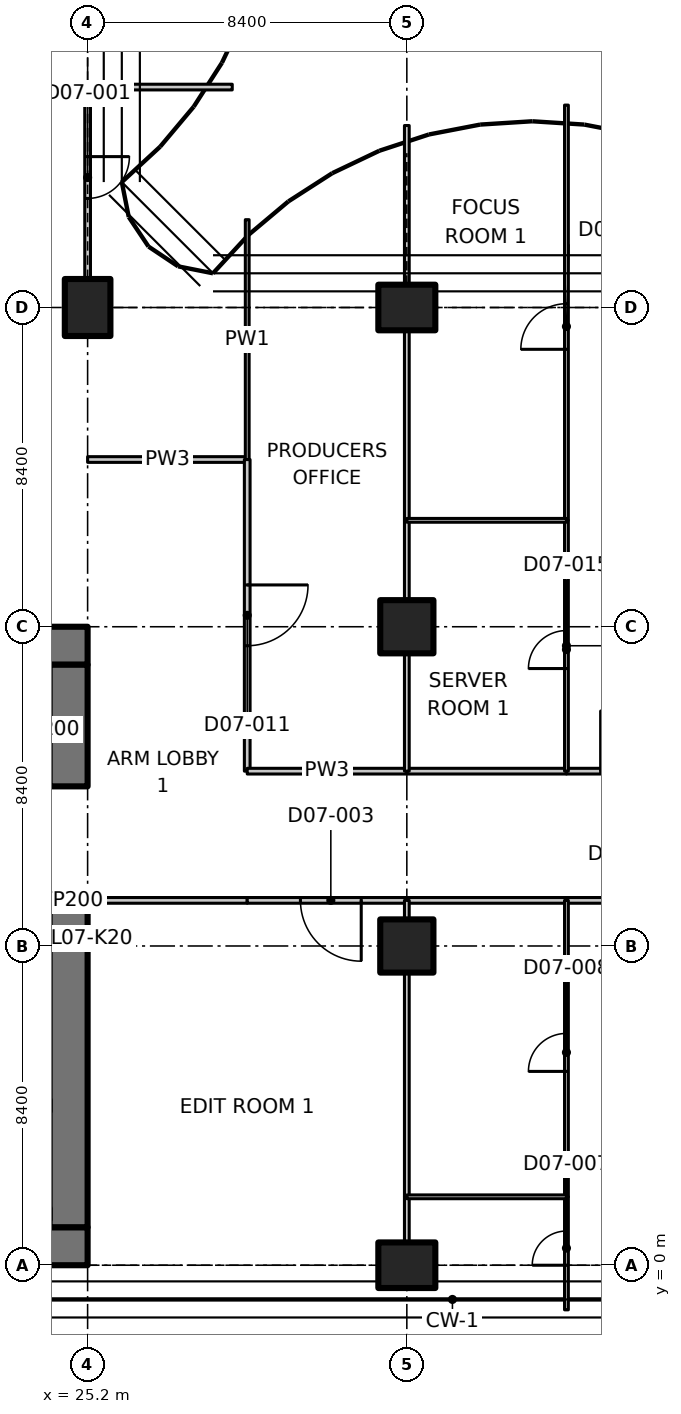
"""IFC4 building model, lengths in metres.
Left out: names, types, materials, properties, quantities, classifications, styles, units other than length and angle.
Written with IfcOpenShell. Run it as: python <this file> out.ifc"""

import sys

from ifc_helpers import new_model, si_unit, direction, frame, frame_2d, origin, origin_2d, place, context, subcontext, project, spatial, polyline, rectangle, outline, extrude, element, fill, save


model = new_model("IFC4")
c1 = context("Model", 3, precision=1e-05, world=origin(), true_north=direction((0.0, 1.0)))
c2 = subcontext(c1, "Body", "Model", "MODEL_VIEW")
j1 = project(units=[si_unit("LENGTHUNIT", "METRE"), si_unit("PLANEANGLEUNIT", "RADIAN")], contexts=[c1])
p1 = place(None, origin())
s1 = spatial("IfcSite", under=j1, at=p1, CompositionType="ELEMENT")
p2 = place(p1, origin())
s2 = spatial("IfcBuilding", under=s1, at=p2, CompositionType="ELEMENT")
p3 = place(p2, frame((0.0, 0.0, 40.1)))
s3 = spatial("IfcBuildingStorey", under=s2, at=p3, CompositionType="ELEMENT", Elevation=40.1)
for number, where, z_axis, x_axis in (
    (1, (25.2, 25.2, 0.0), (0.0, 0.0, 1.0), (1.0, 0.0, 0.0)),
    (2, (33.6, 0.0, 0.0), (0.0, 0.0, 1.0), (0.0, 1.0, 0.0)),
):
    element("IfcColumn", number, at=place(p3, frame(where, z_axis=z_axis, x_axis=x_axis)), inside=s3, PredefinedType="COLUMN", context=c2, shape_type="SweptSolid", body=[
        extrude(rectangle(XDim=1.2, YDim=1.5, at=origin_2d()), origin(), (0.0, 0.0, 1.0), 3.35),
    ])
for number, where, z_axis, x_axis in (
    (3, (33.6, 8.4, 0.0), (0.0, 0.0, 1.0), (1.0, 0.0, 0.0)),
    (4, (33.6, 16.8, 0.0), (0.0, 0.0, 1.0), (1.0, 0.0, 0.0)),
):
    element("IfcColumn", number, at=place(p3, frame(where, z_axis=z_axis, x_axis=x_axis)), inside=s3, PredefinedType="COLUMN", context=c2, shape_type="SweptSolid", body=[
        extrude(rectangle(XDim=1.4, YDim=1.4, at=origin_2d()), origin(), (0.0, 0.0, 1.0), 3.35),
    ])
p4 = place(p3, frame((33.6, 25.2, 0.0), z_axis=(0.0, 0.0, 1.0), x_axis=(0.0, 1.0, 0.0)))
e5 = element("IfcColumn", 5, at=p4, inside=s3, PredefinedType="COLUMN", context=c2, shape_type="SweptSolid", body=[
    extrude(rectangle(XDim=1.2, YDim=1.5, at=origin_2d()), origin(), (0.0, 0.0, 1.0), 3.35),
])
p5 = place(p3, frame((6.936, 0.5, 0.0), z_axis=(0.0, 0.0, 1.0), x_axis=(1.0, 0.0, 0.0)))
e6 = element("IfcWall", 6, at=p5, inside=s3, PredefinedType="SHEAR", context=c2, shape_type="SweptSolid", body=[
    extrude(rectangle(XDim=18.264, YDim=1.0, at=frame_2d((9.132, 0.0))), origin(), (0.0, 0.0, 1.0), 3.35),
])
p6 = place(p3, frame((23.8, 16.3, 0.0), z_axis=(0.0, 0.0, 1.0), x_axis=(1.0, 0.0, 0.0)))
e7 = element("IfcWall", 7, at=p6, inside=s3, PredefinedType="SHEAR", context=c2, shape_type="SweptSolid", body=[
    extrude(rectangle(XDim=1.4, YDim=1.0, at=frame_2d((0.7, 0.0))), origin(), (0.0, 0.0, 1.0), 3.35),
])
p7 = place(p3, frame((24.7, 1.0, 0.0), z_axis=(0.0, 0.0, 1.0), x_axis=(0.0, 1.0, 0.0)))
e8 = element("IfcWall", 8, at=p7, inside=s3, PredefinedType="SHEAR", context=c2, shape_type="SweptSolid", body=[
    extrude(rectangle(XDim=8.8, YDim=1.0, at=frame_2d((4.4, 0.0))), origin(), (0.0, 0.0, 1.0), 3.35),
])
p8 = place(p3, frame((24.7, 12.6, 0.0), z_axis=(0.0, 0.0, 1.0), x_axis=(0.0, 1.0, 0.0)))
e9 = element("IfcWall", 9, at=p8, inside=s3, PredefinedType="SHEAR", context=c2, shape_type="SweptSolid", body=[
    extrude(rectangle(XDim=3.2, YDim=1.0, at=frame_2d((1.6, 0.0))), origin(), (0.0, 0.0, 1.0), 3.35),
])
for number, where, z_axis, x_axis in (
    (10, (25.2, 21.2, 0.0), (0.0, 0.0, 1.0), (1.0, 0.0, 0.0)),
    (11, (29.4, 9.6, 0.0), (0.0, 0.0, 1.0), (-1.0, 0.0, 0.0)),
):
    element("IfcWall", number, at=place(p3, frame(where, z_axis=z_axis, x_axis=x_axis)), inside=s3, PredefinedType="PARTITIONING", context=c2, shape_type="SweptSolid", body=[
        extrude(rectangle(XDim=4.2, YDim=0.15, at=frame_2d((2.1, 0.0))), origin(), (0.0, 0.0, 1.0), 3.33),
    ])
p9 = place(p3, frame((29.4, 21.2, 0.0), z_axis=(0.0, 0.0, 1.0), x_axis=(0.0, -1.0, 0.0)))
e12 = element("IfcWall", 12, at=p9, inside=s3, PredefinedType="PARTITIONING", context=c2, shape_type="SweptSolid", body=[
    extrude(rectangle(XDim=8.2, YDim=0.15, at=frame_2d((4.1, 0.0))), origin(), (0.0, 0.0, 1.0), 3.33),
])
p10 = place(p9, frame((3.3, 0.0, 0.0)))
e13 = element("IfcOpeningElement", 13, at=p10, cuts=e12, PredefinedType="OPENING", context=c2, shape_type="SweptSolid", body=[
    extrude(rectangle(XDim=1.6, YDim=2.1, at=frame_2d((0.8, 1.05))), frame((0.0, 0.085, 0.0), z_axis=(0.0, -1.0, 0.0), x_axis=(1.0, 0.0, 0.0)), (0.0, 0.0, 1.0), 0.17),
])
p11 = place(p3, frame((29.4, 27.511, 0.0), z_axis=(0.0, 0.0, 1.0), x_axis=(0.0, -1.0, 0.0)))
e14 = element("IfcWall", 14, at=p11, inside=s3, PredefinedType="PARTITIONING", context=c2, shape_type="SweptSolid", body=[
    extrude(outline(polyline([(0.0, 0.0), (6.311, 0.0), (6.311, 3.33), (2.761, 3.33), (2.759, 2.98), (1.863, 2.98), (1.861, 3.33), (0.236, 3.33), (0.0, 3.33), (0.0, 0.0)])), frame((0.0, 0.05, 0.0), z_axis=(0.0, -1.0, 0.0), x_axis=(1.0, 0.0, 0.0)), (0.0, 0.0, 1.0), 0.1),
])
p12 = place(p3, frame((25.2, 31.0, 0.0), z_axis=(0.0, 0.0, 1.0), x_axis=(0.0, -1.0, 0.0)))
e15 = element("IfcWall", 15, at=p12, inside=s3, PredefinedType="PARTITIONING", context=c2, shape_type="SweptSolid", body=[
    extrude(outline(polyline([(0.0, 0.0), (5.03, 0.0), (5.03, 2.98), (0.0, 2.98), (0.0, 0.0)])), frame((0.0, 0.075, 0.0), z_axis=(0.0, -1.0, 0.0), x_axis=(1.0, 0.0, 0.0)), (0.0, 0.0, 1.0), 0.15),
])
p13 = place(p12, frame((1.83, 0.0, 0.0)))
e16 = element("IfcOpeningElement", 16, at=p13, cuts=e15, PredefinedType="OPENING", context=c2, shape_type="SweptSolid", body=[
    extrude(rectangle(XDim=1.1, YDim=2.1, at=frame_2d((0.55, 1.05))), frame((0.0, 0.085, 0.0), z_axis=(0.0, -1.0, 0.0), x_axis=(1.0, 0.0, 0.0)), (0.0, 0.0, 1.0), 0.17),
])
p14 = place(p3, frame((25.2, 31.0, 0.0), z_axis=(0.0, 0.0, 1.0), x_axis=(1.0, 0.0, 0.0)))
e17 = element("IfcWall", 17, at=p14, inside=s3, PredefinedType="PARTITIONING", context=c2, shape_type="SweptSolid", body=[
    extrude(rectangle(XDim=3.806, YDim=0.15, at=frame_2d((1.903, 0.0))), origin(), (0.0, 0.0, 1.0), 2.98),
])
p15 = place(p3, frame((33.6, 9.6, 0.0), z_axis=(0.0, 0.0, 1.0), x_axis=(-1.0, 0.0, 0.0)))
e18 = element("IfcWall", 18, at=p15, inside=s3, PredefinedType="PARTITIONING", context=c2, shape_type="SweptSolid", body=[
    extrude(rectangle(XDim=4.2, YDim=0.15, at=frame_2d((2.1, 0.0))), origin(), (0.0, 0.0, 1.0), 3.33),
])
p16 = place(p15, frame((1.2, 0.0, 0.0)))
e19 = element("IfcOpeningElement", 19, at=p16, cuts=e18, PredefinedType="OPENING", context=c2, shape_type="SweptSolid", body=[
    extrude(rectangle(XDim=1.6, YDim=2.1, at=frame_2d((0.8, 1.05))), frame((0.0, 0.085, 0.0), z_axis=(0.0, -1.0, 0.0), x_axis=(1.0, 0.0, 0.0)), (0.0, 0.0, 1.0), 0.17),
])
p17 = place(p3, frame((46.2, 9.6, 0.0), z_axis=(0.0, 0.0, 1.0), x_axis=(-1.0, 0.0, 0.0)))
e20 = element("IfcWall", 20, at=p17, inside=s3, PredefinedType="PARTITIONING", context=c2, shape_type="SweptSolid", body=[
    extrude(rectangle(XDim=8.4, YDim=0.15, at=frame_2d((4.2, 0.0))), origin(), (0.0, 0.0, 1.0), 3.33),
])
p18 = place(p17, frame((1.8, 0.0, 0.0)))
e21 = element("IfcOpeningElement", 21, at=p18, cuts=e20, PredefinedType="OPENING", context=c2, shape_type="SweptSolid", body=[
    extrude(rectangle(XDim=1.6, YDim=2.1, at=frame_2d((0.8, 1.05))), frame((0.0, 0.085, 0.0), z_axis=(0.0, -1.0, 0.0), x_axis=(1.0, 0.0, 0.0)), (0.0, 0.0, 1.0), 0.17),
])
p19 = place(p3, frame((37.8, 9.6, 0.0), z_axis=(0.0, 0.0, 1.0), x_axis=(-1.0, 0.0, 0.0)))
e22 = element("IfcWall", 22, at=p19, inside=s3, PredefinedType="PARTITIONING", context=c2, shape_type="SweptSolid", body=[
    extrude(rectangle(XDim=4.2, YDim=0.15, at=frame_2d((2.1, 0.0))), origin(), (0.0, 0.0, 1.0), 3.33),
])
p20 = place(p3, frame((29.4, 13.0, 0.0), z_axis=(0.0, 0.0, 1.0), x_axis=(1.0, 0.0, 0.0)))
e23 = element("IfcWall", 23, at=p20, inside=s3, PredefinedType="PARTITIONING", context=c2, shape_type="SweptSolid", body=[
    extrude(rectangle(XDim=4.2, YDim=0.15, at=frame_2d((2.1, 0.0))), origin(), (0.0, 0.0, 1.0), 3.33),
])
p21 = place(p3, frame((37.8, 13.0, 0.0), z_axis=(0.0, 0.0, 1.0), x_axis=(1.0, 0.0, 0.0)))
e24 = element("IfcWall", 24, at=p21, inside=s3, PredefinedType="PARTITIONING", context=c2, shape_type="SweptSolid", body=[
    extrude(rectangle(XDim=3.4, YDim=0.15, at=frame_2d((1.7, 0.0))), origin(), (0.0, 0.0, 1.0), 3.33),
])
p22 = place(p21, frame((0.9, 0.0, 0.0)))
e25 = element("IfcOpeningElement", 25, at=p22, cuts=e24, PredefinedType="OPENING", context=c2, shape_type="SweptSolid", body=[
    extrude(rectangle(XDim=1.6, YDim=2.1, at=frame_2d((0.8, 1.05))), frame((0.0, 0.085, 0.0), z_axis=(0.0, -1.0, 0.0), x_axis=(1.0, 0.0, 0.0)), (0.0, 0.0, 1.0), 0.17),
])
p23 = place(p3, frame((33.6, 13.0, 0.0), z_axis=(0.0, 0.0, 1.0), x_axis=(1.0, 0.0, 0.0)))
e26 = element("IfcWall", 26, at=p23, inside=s3, PredefinedType="PARTITIONING", context=c2, shape_type="SweptSolid", body=[
    extrude(rectangle(XDim=4.2, YDim=0.15, at=frame_2d((2.1, 0.0))), origin(), (0.0, 0.0, 1.0), 3.33),
])
p24 = place(p3, frame((33.6, 1.8, 0.0), z_axis=(0.0, 0.0, 1.0), x_axis=(0.0, -1.0, 0.0)))
e27 = element("IfcWall", 27, at=p24, inside=s3, PredefinedType="PARTITIONING", context=c2, shape_type="SweptSolid", body=[
    extrude(rectangle(XDim=1.18, YDim=0.125, at=frame_2d((0.59, 0.0))), origin(), (0.0, 0.0, 1.0), 3.33),
])
p25 = place(p3, frame((33.6, 9.6, 0.0), z_axis=(0.0, 0.0, 1.0), x_axis=(0.0, -1.0, 0.0)))
e28 = element("IfcWall", 28, at=p25, inside=s3, PredefinedType="PARTITIONING", context=c2, shape_type="SweptSolid", body=[
    extrude(rectangle(XDim=0.48, YDim=0.125, at=frame_2d((0.24, 0.0))), origin(), (0.0, 0.0, 1.0), 3.33),
])
p26 = place(p3, frame((33.6, 7.68, 0.0), z_axis=(0.0, 0.0, 1.0), x_axis=(0.0, -1.0, 0.0)))
e29 = element("IfcWall", 29, at=p26, inside=s3, PredefinedType="PARTITIONING", context=c2, shape_type="SweptSolid", body=[
    extrude(rectangle(XDim=5.88, YDim=0.125, at=frame_2d((2.94, 0.0))), origin(), (0.0, 0.0, 1.0), 3.33),
])
p27 = place(p3, frame((37.8, -1.174, 0.0), z_axis=(0.0, 0.0, 1.0), x_axis=(0.0, 1.0, 0.0)))
e30 = element("IfcWall", 30, at=p27, inside=s3, PredefinedType="PARTITIONING", context=c2, shape_type="SweptSolid", body=[
    extrude(rectangle(XDim=2.974, YDim=0.1, at=frame_2d((1.487, 0.0))), origin(), (0.0, 0.0, 1.0), 2.98),
])
p28 = place(p27, frame((1.174, 0.0, 0.0)))
e31 = element("IfcOpeningElement", 31, at=p28, cuts=e30, PredefinedType="OPENING", context=c2, shape_type="SweptSolid", body=[
    extrude(rectangle(XDim=0.9, YDim=2.1, at=frame_2d((0.45, 1.05))), frame((0.0, 0.06, 0.0), z_axis=(0.0, -1.0, 0.0), x_axis=(1.0, 0.0, 0.0)), (0.0, 0.0, 1.0), 0.12),
])
p29 = place(p3, frame((37.8, 1.8, 0.0), z_axis=(0.0, 0.0, 1.0), x_axis=(0.0, 1.0, 0.0)))
e32 = element("IfcWall", 32, at=p29, inside=s3, PredefinedType="PARTITIONING", context=c2, shape_type="SweptSolid", body=[
    extrude(rectangle(XDim=7.8, YDim=0.1, at=frame_2d((3.9, 0.0))), origin(), (0.0, 0.0, 1.0), 3.33),
])
p30 = place(p29, frame((3.3, 0.0, 0.0)))
e33 = element("IfcOpeningElement", 33, at=p30, cuts=e32, PredefinedType="OPENING", context=c2, shape_type="SweptSolid", body=[
    extrude(rectangle(XDim=1.0, YDim=2.1, at=frame_2d((0.5, 1.05))), frame((0.0, 0.06, 0.0), z_axis=(0.0, -1.0, 0.0), x_axis=(1.0, 0.0, 0.0)), (0.0, 0.0, 1.0), 0.12),
])
p31 = place(p3, frame((33.6, 1.8, 0.0), z_axis=(0.0, 0.0, 1.0), x_axis=(1.0, 0.0, 0.0)))
e34 = element("IfcWall", 34, at=p31, inside=s3, PredefinedType="PARTITIONING", context=c2, shape_type="SweptSolid", body=[
    extrude(rectangle(XDim=4.2, YDim=0.1, at=frame_2d((2.1, 0.0))), origin(), (0.0, 0.0, 1.0), 3.33),
])
p32 = place(p3, frame((33.6, 19.6, 0.0), z_axis=(0.0, 0.0, 1.0), x_axis=(0.0, -1.0, 0.0)))
e35 = element("IfcWall", 35, at=p32, inside=s3, PredefinedType="PARTITIONING", context=c2, shape_type="SweptSolid", body=[
    extrude(rectangle(XDim=2.08, YDim=0.125, at=frame_2d((1.04, 0.0))), origin(), (0.0, 0.0, 1.0), 3.33),
])
p33 = place(p3, frame((33.6, 16.08, 0.0), z_axis=(0.0, 0.0, 1.0), x_axis=(0.0, -1.0, 0.0)))
e36 = element("IfcWall", 36, at=p33, inside=s3, PredefinedType="PARTITIONING", context=c2, shape_type="SweptSolid", body=[
    extrude(rectangle(XDim=3.08, YDim=0.125, at=frame_2d((1.54, 0.0))), origin(), (0.0, 0.0, 1.0), 3.33),
])
p34 = place(p3, frame((33.6, 29.988, 0.0), z_axis=(0.0, 0.0, 1.0), x_axis=(0.0, -1.0, 0.0)))
e37 = element("IfcWall", 37, at=p34, inside=s3, PredefinedType="PARTITIONING", context=c2, shape_type="SweptSolid", body=[
    extrude(rectangle(XDim=4.168, YDim=0.125, at=frame_2d((2.084, 0.0))), origin(), (0.0, 0.0, 1.0), 2.98),
])
p35 = place(p3, frame((33.6, 24.58, 0.0), z_axis=(0.0, 0.0, 1.0), x_axis=(0.0, -1.0, 0.0)))
e38 = element("IfcWall", 38, at=p35, inside=s3, PredefinedType="PARTITIONING", context=c2, shape_type="SweptSolid", body=[
    extrude(rectangle(XDim=4.98, YDim=0.125, at=frame_2d((2.49, 0.0))), origin(), (0.0, 0.0, 1.0), 3.33),
])
p36 = place(p3, frame((37.8, 13.0, 0.0), z_axis=(0.0, 0.0, 1.0), x_axis=(0.0, 1.0, 0.0)))
e39 = element("IfcWall", 39, at=p36, inside=s3, PredefinedType="PARTITIONING", context=c2, shape_type="SweptSolid", body=[
    extrude(rectangle(XDim=6.6, YDim=0.1, at=frame_2d((3.3, 0.0))), origin(), (0.0, 0.0, 1.0), 3.33),
])
p37 = place(p36, frame((2.7, 0.0, 0.0)))
e40 = element("IfcOpeningElement", 40, at=p37, cuts=e39, PredefinedType="OPENING", context=c2, shape_type="SweptSolid", body=[
    extrude(rectangle(XDim=1.0, YDim=2.1, at=frame_2d((0.5, 1.05))), frame((0.0, 0.06, 0.0), z_axis=(0.0, -1.0, 0.0), x_axis=(1.0, 0.0, 0.0)), (0.0, 0.0, 1.0), 0.12),
])
p38 = place(p3, frame((37.8, 19.6, 0.0), z_axis=(0.0, 0.0, 1.0), x_axis=(0.0, 1.0, 0.0)))
e41 = element("IfcWall", 41, at=p38, inside=s3, PredefinedType="PARTITIONING", context=c2, shape_type="SweptSolid", body=[
    extrude(outline(polyline([(0.0, 0.0), (10.926, 0.0), (10.926, 3.33), (10.643, 3.33), (6.05, 3.33), (6.048, 2.98), (5.152, 2.98), (5.15, 3.33), (0.0, 3.33), (0.0, 0.0)])), frame((0.0, 0.05, 0.0), z_axis=(0.0, -1.0, 0.0), x_axis=(1.0, 0.0, 0.0)), (0.0, 0.0, 1.0), 0.1),
])
p39 = place(p38, frame((4.5, 0.0, 0.0)))
e42 = element("IfcOpeningElement", 42, at=p39, cuts=e41, PredefinedType="OPENING", context=c2, shape_type="SweptSolid", body=[
    extrude(rectangle(XDim=1.2, YDim=2.1, at=frame_2d((0.6, 1.05))), frame((0.0, 0.06, 0.0), z_axis=(0.0, -1.0, 0.0), x_axis=(1.0, 0.0, 0.0)), (0.0, 0.0, 1.0), 0.12),
])
p40 = place(p3, frame((33.6, 19.6, 0.0), z_axis=(0.0, 0.0, 1.0), x_axis=(1.0, 0.0, 0.0)))
e43 = element("IfcWall", 43, at=p40, inside=s3, PredefinedType="PARTITIONING", context=c2, shape_type="SweptSolid", body=[
    extrude(rectangle(XDim=4.2, YDim=0.1, at=frame_2d((2.1, 0.0))), origin(), (0.0, 0.0, 1.0), 3.33),
])
p41 = place(p13, origin())
e44 = element("IfcDoor", 44, at=p41, inside=s3, OperationType="SINGLE_SWING_RIGHT", PredefinedType="DOOR", context=c2, shape_type="SweptSolid", body=[
    extrude(rectangle(XDim=1.1, YDim=2.1, at=frame_2d((0.55, 1.05))), frame((0.0, 0.025, 0.0), z_axis=(0.0, -1.0, 0.0), x_axis=(1.0, 0.0, 0.0)), (0.0, 0.0, 1.0), 0.05),
])
fill(e16, e44)
p42 = place(p16, origin())
e45 = element("IfcDoor", 45, at=p42, inside=s3, OperationType="DOUBLE_DOOR_SINGLE_SWING", PredefinedType="DOOR", context=c2, shape_type="SweptSolid", body=[
    extrude(rectangle(XDim=1.6, YDim=2.1, at=frame_2d((0.8, 1.05))), frame((0.0, 0.025, 0.0), z_axis=(0.0, -1.0, 0.0), x_axis=(1.0, 0.0, 0.0)), (0.0, 0.0, 1.0), 0.05),
])
fill(e19, e45)
p43 = place(p28, origin())
e46 = element("IfcDoor", 46, at=p43, inside=s3, OperationType="SINGLE_SWING_LEFT", PredefinedType="DOOR", context=c2, shape_type="SweptSolid", body=[
    extrude(rectangle(XDim=0.9, YDim=2.1, at=frame_2d((0.45, 1.05))), frame((0.0, 0.025, 0.0), z_axis=(0.0, -1.0, 0.0), x_axis=(1.0, 0.0, 0.0)), (0.0, 0.0, 1.0), 0.05),
])
fill(e31, e46)
p44 = place(p30, origin())
e47 = element("IfcDoor", 47, at=p44, inside=s3, OperationType="SINGLE_SWING_LEFT", PredefinedType="DOOR", context=c2, shape_type="SweptSolid", body=[
    extrude(rectangle(XDim=1.0, YDim=2.1, at=frame_2d((0.5, 1.05))), frame((0.0, 0.025, 0.0), z_axis=(0.0, -1.0, 0.0), x_axis=(1.0, 0.0, 0.0)), (0.0, 0.0, 1.0), 0.05),
])
fill(e33, e47)
p45 = place(p10, origin())
e48 = element("IfcDoor", 48, at=p45, inside=s3, OperationType="DOUBLE_DOOR_SINGLE_SWING", PredefinedType="DOOR", context=c2, shape_type="SweptSolid", body=[
    extrude(rectangle(XDim=1.6, YDim=2.1, at=frame_2d((0.8, 1.05))), frame((0.0, 0.025, 0.0), z_axis=(0.0, -1.0, 0.0), x_axis=(1.0, 0.0, 0.0)), (0.0, 0.0, 1.0), 0.05),
])
fill(e13, e48)
p46 = place(p22, origin())
e49 = element("IfcDoor", 49, at=p46, inside=s3, OperationType="DOUBLE_DOOR_SINGLE_SWING", PredefinedType="DOOR", context=c2, shape_type="SweptSolid", body=[
    extrude(rectangle(XDim=1.6, YDim=2.1, at=frame_2d((0.8, 1.05))), frame((0.0, 0.025, 0.0), z_axis=(0.0, -1.0, 0.0), x_axis=(1.0, 0.0, 0.0)), (0.0, 0.0, 1.0), 0.05),
])
fill(e25, e49)
p47 = place(p37, origin())
e50 = element("IfcDoor", 50, at=p47, inside=s3, OperationType="SINGLE_SWING_LEFT", PredefinedType="DOOR", context=c2, shape_type="SweptSolid", body=[
    extrude(rectangle(XDim=1.0, YDim=2.1, at=frame_2d((0.5, 1.05))), frame((0.0, 0.025, 0.0), z_axis=(0.0, -1.0, 0.0), x_axis=(1.0, 0.0, 0.0)), (0.0, 0.0, 1.0), 0.05),
])
fill(e40, e50)
p48 = place(p39, origin())
e51 = element("IfcDoor", 51, at=p48, inside=s3, OperationType="SINGLE_SWING_LEFT", PredefinedType="DOOR", context=c2, shape_type="SweptSolid", body=[
    extrude(rectangle(XDim=1.2, YDim=2.1, at=frame_2d((0.6, 1.05))), frame((0.0, 0.025, 0.0), z_axis=(0.0, -1.0, 0.0), x_axis=(1.0, 0.0, 0.0)), (0.0, 0.0, 1.0), 0.05),
])
fill(e42, e51)
save(model, sys.argv[1])
